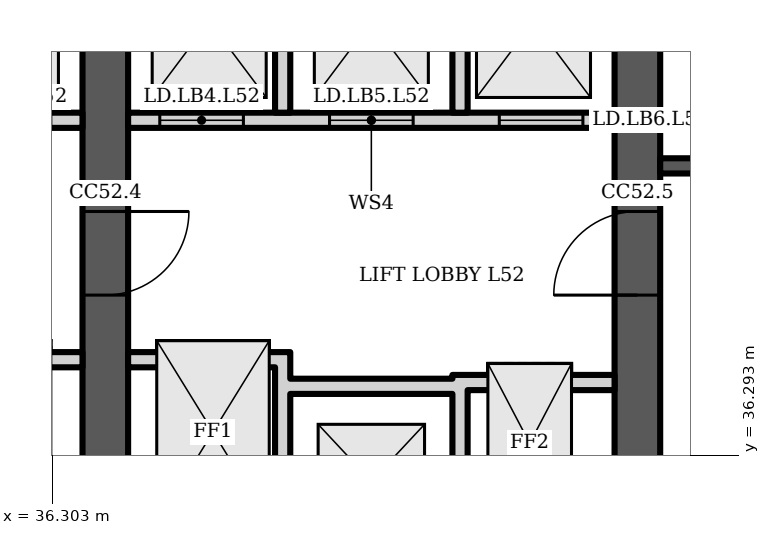
"""IFC4 building model, lengths in metres.
Left out: names, types, materials, properties, quantities, classifications, styles, units other than length and angle.
Written with IfcOpenShell. Run it as: python <this file> out.ifc"""

import sys

from ifc_helpers import new_model, si_unit, direction, frame, frame_2d, origin, place, context, subcontext, project, spatial, polyline, rectangle, outline, extrude, element, fill, save


model = new_model("IFC4")
c1 = context("Model", 3, precision=1e-05, world=origin(), true_north=direction((0.0, 1.0)))
c2 = subcontext(c1, "Body", "Model", "MODEL_VIEW")
j1 = project(units=[si_unit("LENGTHUNIT", "METRE"), si_unit("PLANEANGLEUNIT", "RADIAN")], contexts=[c1])
p1 = place(None, origin())
s1 = spatial("IfcSite", under=j1, at=p1, CompositionType="ELEMENT")
p2 = place(p1, origin())
s2 = spatial("IfcBuilding", under=s1, at=p2, CompositionType="ELEMENT")
p3 = place(p2, frame((0.0, 0.0, 210.7)))
s3 = spatial("IfcBuildingStorey", under=s2, at=p3, CompositionType="ELEMENT", Elevation=210.7)
p4 = place(p3, frame((37.0, 34.6, 0.0), z_axis=(0.0, 0.0, 1.0), x_axis=(0.0, 1.0, 0.0)))
e1 = element("IfcWall", 1, at=p4, inside=s3, PredefinedType="SHEAR", context=c2, shape_type="SweptSolid", body=[
    extrude(rectangle(XDim=14.784, YDim=0.6, at=frame_2d((7.392, 0.0))), origin(), (0.0, 0.0, 1.0), 3.6),
])
p5 = place(p4, frame((11.302, 0.0, 0.0)))
e2 = element("IfcOpeningElement", 2, at=p5, cuts=e1, PredefinedType="OPENING", context=c2, shape_type="SweptSolid", body=[
    extrude(rectangle(XDim=1.0, YDim=2.1, at=frame_2d((0.5, 1.05))), frame((0.0, 0.31, 0.0), z_axis=(0.0, -1.0, 0.0), x_axis=(1.0, 0.0, 0.0)), (0.0, 0.0, 1.0), 0.62),
])
p6 = place(p4, frame((3.8, 0.0, 0.0)))
e3 = element("IfcOpeningElement", 3, at=p6, cuts=e1, PredefinedType="OPENING", context=c2, shape_type="SweptSolid", body=[
    extrude(rectangle(XDim=1.1, YDim=2.1, at=frame_2d((0.55, 1.05))), frame((0.0, 0.31, 0.0), z_axis=(0.0, -1.0, 0.0), x_axis=(1.0, 0.0, 0.0)), (0.0, 0.0, 1.0), 0.62),
])
p7 = place(p3, frame((44.0, 34.6, 0.0), z_axis=(0.0, 0.0, 1.0), x_axis=(0.0, 1.0, 0.0)))
e4 = element("IfcWall", 4, at=p7, inside=s3, PredefinedType="SHEAR", context=c2, shape_type="SweptSolid", body=[
    extrude(rectangle(XDim=14.784, YDim=0.6, at=frame_2d((7.392, 0.0))), origin(), (0.0, 0.0, 1.0), 3.6),
])
p8 = place(p7, frame((11.608, 0.0, 0.0)))
e5 = element("IfcOpeningElement", 5, at=p8, cuts=e4, PredefinedType="OPENING", context=c2, shape_type="SweptSolid", body=[
    extrude(rectangle(XDim=1.0, YDim=2.1, at=frame_2d((0.5, 1.05))), frame((0.0, 0.31, 0.0), z_axis=(0.0, -1.0, 0.0), x_axis=(1.0, 0.0, 0.0)), (0.0, 0.0, 1.0), 0.62),
])
p9 = place(p7, frame((3.8, 0.0, 0.0)))
e6 = element("IfcOpeningElement", 6, at=p9, cuts=e4, PredefinedType="OPENING", context=c2, shape_type="SweptSolid", body=[
    extrude(rectangle(XDim=1.1, YDim=2.1, at=frame_2d((0.55, 1.05))), frame((0.0, 0.31, 0.0), z_axis=(0.0, -1.0, 0.0), x_axis=(1.0, 0.0, 0.0)), (0.0, 0.0, 1.0), 0.62),
])
p10 = place(p3, frame((30.3, 40.7, 0.0), z_axis=(0.0, 0.0, 1.0), x_axis=(1.0, 0.0, 0.0)))
e7 = element("IfcWall", 7, at=p10, inside=s3, PredefinedType="PARTITIONING", context=c2, shape_type="SweptSolid", body=[
    extrude(rectangle(XDim=6.4, YDim=0.2, at=frame_2d((3.2, 0.0))), origin(), (0.0, 0.0, 1.0), 3.2),
])
p11 = place(p10, frame((0.417, 0.0, 0.0)))
e8 = element("IfcOpeningElement", 8, at=p11, cuts=e7, PredefinedType="OPENING", context=c2, shape_type="SweptSolid", body=[
    extrude(rectangle(XDim=1.1, YDim=2.1, at=frame_2d((0.55, 1.05))), frame((0.0, 0.11, 0.0), z_axis=(0.0, -1.0, 0.0), x_axis=(1.0, 0.0, 0.0)), (0.0, 0.0, 1.0), 0.22),
])
p12 = place(p10, frame((2.65, 0.0, 0.0)))
e9 = element("IfcOpeningElement", 9, at=p12, cuts=e7, PredefinedType="OPENING", context=c2, shape_type="SweptSolid", body=[
    extrude(rectangle(XDim=1.1, YDim=2.1, at=frame_2d((0.55, 1.05))), frame((0.0, 0.11, 0.0), z_axis=(0.0, -1.0, 0.0), x_axis=(1.0, 0.0, 0.0)), (0.0, 0.0, 1.0), 0.22),
])
p13 = place(p10, frame((4.883, 0.0, 0.0)))
e10 = element("IfcOpeningElement", 10, at=p13, cuts=e7, PredefinedType="OPENING", context=c2, shape_type="SweptSolid", body=[
    extrude(rectangle(XDim=1.1, YDim=2.1, at=frame_2d((0.55, 1.05))), frame((0.0, 0.11, 0.0), z_axis=(0.0, -1.0, 0.0), x_axis=(1.0, 0.0, 0.0)), (0.0, 0.0, 1.0), 0.22),
])
p14 = place(p3, frame((0.0, 0.0, -0.0)))
e11 = element("IfcWall", 11, at=p14, inside=s3, PredefinedType="PARTITIONING", context=c2, shape_type="SweptSolid", body=[
    extrude(outline(polyline([(34.567, 37.65), (34.767, 37.65), (36.7, 37.65), (36.7, 37.45), (34.767, 37.45), (34.767, 34.6), (34.567, 34.6), (34.567, 37.65)])), origin(), (0.0, 0.0, 1.0), 3.2),
])
p15 = place(p3, frame((0.0, 0.0, -0.0)))
e12 = element("IfcWall", 12, at=p15, inside=s3, PredefinedType="PARTITIONING", context=c2, shape_type="SweptSolid", body=[
    extrude(outline(polyline([(32.433, 40.8), (32.233, 40.8), (32.233, 43.8), (30.3, 43.8), (30.3, 44.0), (36.7, 44.0), (36.7, 43.8), (34.767, 43.8), (34.767, 40.8), (34.567, 40.8), (34.567, 43.8), (32.433, 43.8), (32.433, 40.8)])), origin(), (0.0, 0.0, 1.0), 3.2),
])
p16 = place(p3, frame((37.3, 40.7, 0.0), z_axis=(0.0, 0.0, 1.0), x_axis=(1.0, 0.0, 0.0)))
e13 = element("IfcWall", 13, at=p16, inside=s3, PredefinedType="PARTITIONING", context=c2, shape_type="SweptSolid", body=[
    extrude(rectangle(XDim=6.4, YDim=0.2, at=frame_2d((3.2, 0.0))), origin(), (0.0, 0.0, 1.0), 3.2),
])
p17 = place(p16, frame((0.417, 0.0, 0.0)))
e14 = element("IfcOpeningElement", 14, at=p17, cuts=e13, PredefinedType="OPENING", context=c2, shape_type="SweptSolid", body=[
    extrude(rectangle(XDim=1.1, YDim=2.1, at=frame_2d((0.55, 1.05))), frame((0.0, 0.11, 0.0), z_axis=(0.0, -1.0, 0.0), x_axis=(1.0, 0.0, 0.0)), (0.0, 0.0, 1.0), 0.22),
])
p18 = place(p16, frame((2.65, 0.0, 0.0)))
e15 = element("IfcOpeningElement", 15, at=p18, cuts=e13, PredefinedType="OPENING", context=c2, shape_type="SweptSolid", body=[
    extrude(rectangle(XDim=1.1, YDim=2.1, at=frame_2d((0.55, 1.05))), frame((0.0, 0.11, 0.0), z_axis=(0.0, -1.0, 0.0), x_axis=(1.0, 0.0, 0.0)), (0.0, 0.0, 1.0), 0.22),
])
p19 = place(p16, frame((4.883, 0.0, 0.0)))
e16 = element("IfcOpeningElement", 16, at=p19, cuts=e13, PredefinedType="OPENING", context=c2, shape_type="SweptSolid", body=[
    extrude(rectangle(XDim=1.1, YDim=2.1, at=frame_2d((0.55, 1.05))), frame((0.0, 0.11, 0.0), z_axis=(0.0, -1.0, 0.0), x_axis=(1.0, 0.0, 0.0)), (0.0, 0.0, 1.0), 0.22),
])
p20 = place(p3, frame((0.0, 0.0, -0.0)))
e17 = element("IfcWall", 17, at=p20, inside=s3, PredefinedType="PARTITIONING", context=c2, shape_type="SweptSolid", body=[
    extrude(outline(polyline([(41.567, 37.1), (39.433, 37.1), (39.433, 34.6), (39.233, 34.6), (39.233, 37.45), (37.3, 37.45), (37.3, 37.65), (39.233, 37.65), (39.433, 37.65), (39.433, 37.3), (41.567, 37.3), (41.567, 37.35), (41.767, 37.35), (43.7, 37.35), (43.7, 37.15), (41.767, 37.15), (41.767, 34.6), (41.567, 34.6), (41.567, 37.1)])), origin(), (0.0, 0.0, 1.0), 3.2),
])
p21 = place(p3, frame((0.0, 0.0, -0.0)))
e18 = element("IfcWall", 18, at=p21, inside=s3, PredefinedType="PARTITIONING", context=c2, shape_type="SweptSolid", body=[
    extrude(outline(polyline([(39.433, 40.8), (39.233, 40.8), (39.233, 43.8), (37.3, 43.8), (37.3, 44.0), (43.7, 44.0), (43.7, 43.8), (41.767, 43.8), (41.767, 40.8), (41.567, 40.8), (41.567, 43.8), (39.433, 43.8), (39.433, 40.8)])), origin(), (0.0, 0.0, 1.0), 3.2),
])
p22 = place(p3, frame((44.3, 40.1, 0.0), z_axis=(0.0, 0.0, 1.0), x_axis=(1.0, 0.0, 0.0)))
e19 = element("IfcWall", 19, at=p22, inside=s3, PredefinedType="SHEAR", context=c2, shape_type="SweptSolid", body=[
    extrude(rectangle(XDim=6.4, YDim=0.2, at=frame_2d((3.2, 0.0))), origin(), (0.0, 0.0, 1.0), 3.2),
])
p23 = place(p22, frame((3.625, 0.0, 0.0)))
e20 = element("IfcOpeningElement", 20, at=p23, cuts=e19, PredefinedType="OPENING", context=c2, shape_type="SweptSolid", body=[
    extrude(rectangle(XDim=1.2, YDim=2.1, at=frame_2d((0.6, 1.05))), frame((0.0, 0.11, 0.0), z_axis=(0.0, -1.0, 0.0), x_axis=(1.0, 0.0, 0.0)), (0.0, 0.0, 1.0), 0.22),
])
p24 = place(p22, frame((0.625, 0.0, 0.0)))
e21 = element("IfcOpeningElement", 21, at=p24, cuts=e19, PredefinedType="OPENING", context=c2, shape_type="SweptSolid", body=[
    extrude(rectangle(XDim=0.9, YDim=2.1, at=frame_2d((0.45, 1.05))), frame((0.0, 0.11, 0.0), z_axis=(0.0, -1.0, 0.0), x_axis=(1.0, 0.0, 0.0)), (0.0, 0.0, 1.0), 0.22),
])
p25 = place(p17, origin())
e22 = element("IfcDoor", 22, at=p25, inside=s3, OperationType="DOUBLE_DOOR_SLIDING", PredefinedType="DOOR", context=c2, shape_type="SweptSolid", body=[
    extrude(rectangle(XDim=1.1, YDim=2.1, at=frame_2d((0.55, 1.05))), frame((0.0, 0.025, 0.0), z_axis=(0.0, -1.0, 0.0), x_axis=(1.0, 0.0, 0.0)), (0.0, 0.0, 1.0), 0.05),
])
fill(e14, e22)
p26 = place(p18, origin())
e23 = element("IfcDoor", 23, at=p26, inside=s3, OperationType="DOUBLE_DOOR_SLIDING", PredefinedType="DOOR", context=c2, shape_type="SweptSolid", body=[
    extrude(rectangle(XDim=1.1, YDim=2.1, at=frame_2d((0.55, 1.05))), frame((0.0, 0.025, 0.0), z_axis=(0.0, -1.0, 0.0), x_axis=(1.0, 0.0, 0.0)), (0.0, 0.0, 1.0), 0.05),
])
fill(e15, e23)
p27 = place(p19, origin())
e24 = element("IfcDoor", 24, at=p27, inside=s3, OperationType="DOUBLE_DOOR_SLIDING", PredefinedType="DOOR", context=c2, shape_type="SweptSolid", body=[
    extrude(rectangle(XDim=1.1, YDim=2.1, at=frame_2d((0.55, 1.05))), frame((0.0, 0.025, 0.0), z_axis=(0.0, -1.0, 0.0), x_axis=(1.0, 0.0, 0.0)), (0.0, 0.0, 1.0), 0.05),
])
fill(e16, e24)
p28 = place(p6, origin())
e25 = element("IfcDoor", 25, at=p28, inside=s3, OperationType="SINGLE_SWING_RIGHT", PredefinedType="DOOR", context=c2, shape_type="SweptSolid", body=[
    extrude(rectangle(XDim=1.1, YDim=2.1, at=frame_2d((0.55, 1.05))), frame((0.0, 0.025, 0.0), z_axis=(0.0, -1.0, 0.0), x_axis=(1.0, 0.0, 0.0)), (0.0, 0.0, 1.0), 0.05),
])
fill(e3, e25)
p29 = place(p9, origin())
e26 = element("IfcDoor", 26, at=p29, inside=s3, OperationType="SINGLE_SWING_LEFT", PredefinedType="DOOR", context=c2, shape_type="SweptSolid", body=[
    extrude(rectangle(XDim=1.1, YDim=2.1, at=frame_2d((0.55, 1.05))), frame((0.0, 0.025, 0.0), z_axis=(0.0, -1.0, 0.0), x_axis=(1.0, 0.0, 0.0)), (0.0, 0.0, 1.0), 0.05),
])
fill(e6, e26)
save(model, sys.argv[1])
